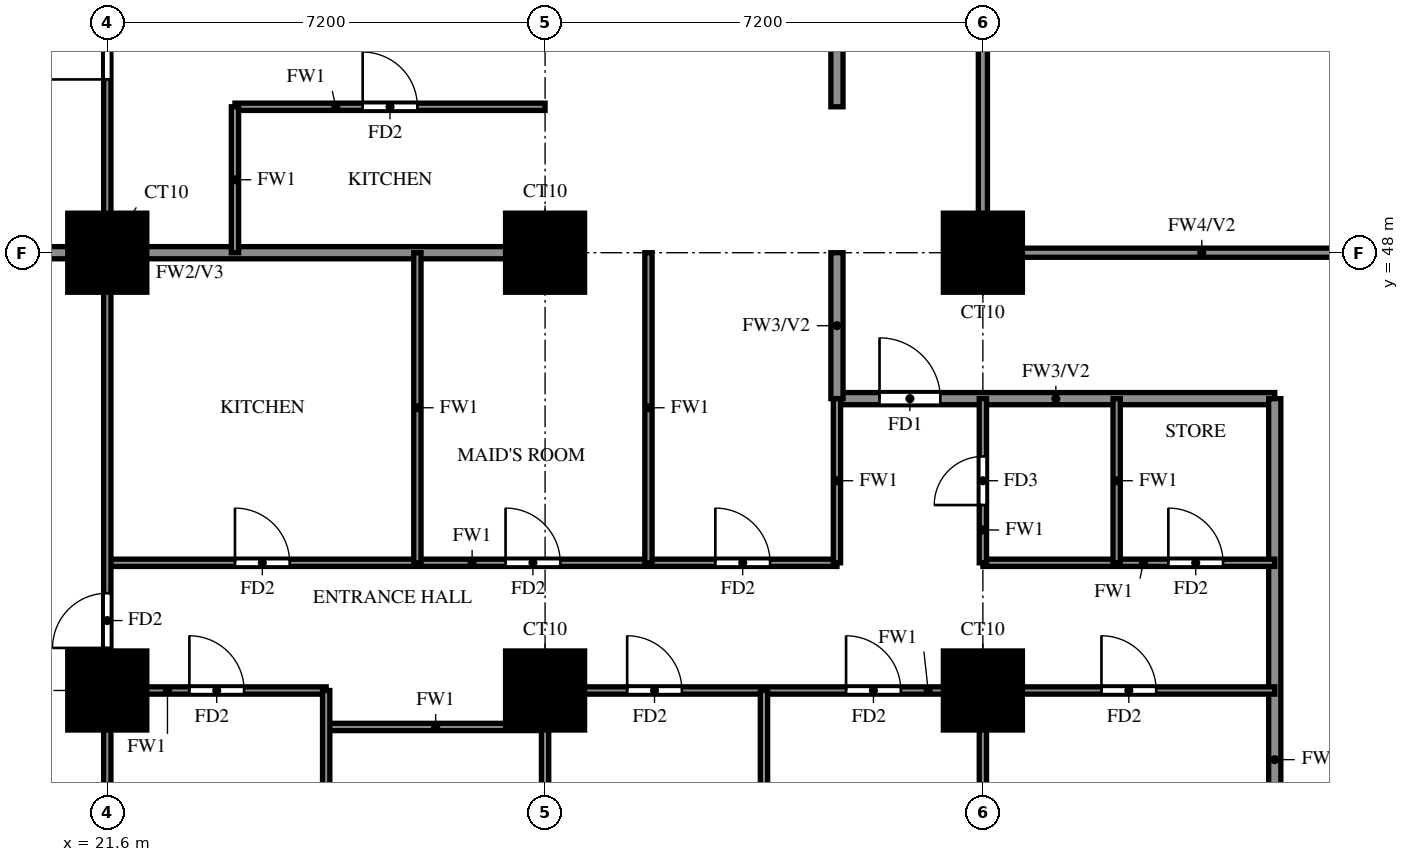
"""IFC4 building model, lengths in metres.
Left out: names, types, materials, properties, quantities, classifications, styles, units other than length and angle.
Written with IfcOpenShell. Run it as: python <this file> out.ifc"""

import sys

from ifc_helpers import new_model, si_unit, direction, frame, frame_2d, origin, origin_2d, place, context, subcontext, project, spatial, rectangle, extrude, source, transform, mapped, element, fill, save


model = new_model("IFC4")
c1 = context("Model", 3, precision=1e-05, world=origin(), true_north=direction((0.0, 1.0)))
c2 = subcontext(c1, "Body", "Model", "MODEL_VIEW")
j1 = project(units=[si_unit("LENGTHUNIT", "METRE"), si_unit("PLANEANGLEUNIT", "RADIAN")], contexts=[c1])
p1 = place(None, origin())
s1 = spatial("IfcSite", under=j1, at=p1, CompositionType="ELEMENT")
p2 = place(p1, origin())
s2 = spatial("IfcBuilding", under=s1, at=p2, CompositionType="ELEMENT")
p3 = place(p2, frame((0.0, 0.0, 72.5)))
s3 = spatial("IfcBuildingStorey", under=s2, at=p3, CompositionType="ELEMENT", Elevation=72.5)
m1 = source(origin(), c2, "Body", "SweptSolid", [
    extrude(rectangle(XDim=1.3, YDim=1.3, at=origin_2d()), origin(), (0.0, 0.0, 1.0), 3.18),
])
for number, where, z_axis, x_axis in (
    (1, (21.6, 40.8, 0.0), (0.0, 0.0, 1.0), (1.0, 0.0, 0.0)),
    (2, (28.8, 40.8, 0.0), (0.0, 0.0, 1.0), (1.0, 0.0, 0.0)),
    (3, (36.0, 40.8, 0.0), (0.0, 0.0, 1.0), (1.0, 0.0, 0.0)),
    (4, (21.6, 48.0, 0.0), (0.0, 0.0, 1.0), (1.0, 0.0, 0.0)),
    (5, (28.8, 48.0, 0.0), (0.0, 0.0, 1.0), (1.0, 0.0, 0.0)),
    (6, (36.0, 48.0, 0.0), (0.0, 0.0, 1.0), (1.0, 0.0, 0.0)),
):
    element("IfcColumn", number, at=place(p3, frame(where, z_axis=z_axis, x_axis=x_axis)), inside=s3, PredefinedType="COLUMN", context=c2, shape_type="MappedRepresentation", body=[
        mapped(m1, transform((0.0, 0.0, 0.0))),
    ])
p4 = place(p3, frame((33.6, 45.6, 0.0), z_axis=(0.0, 0.0, 1.0), x_axis=(1.0, 0.0, 0.0)))
e7 = element("IfcWall", 7, at=p4, inside=s3, PredefinedType="SOLIDWALL", context=c2, shape_type="SweptSolid", body=[
    extrude(rectangle(XDim=7.2, YDim=0.2, at=frame_2d((3.6, 0.0))), origin(), (0.0, 0.0, 1.0), 3.18),
])
p5 = place(p4, frame((0.7, 0.0, 0.0)))
e8 = element("IfcOpeningElement", 8, at=p5, cuts=e7, PredefinedType="OPENING", context=c2, shape_type="SweptSolid", body=[
    extrude(rectangle(XDim=1.0, YDim=2.1, at=frame_2d((0.5, 1.05))), frame((0.0, 0.11, 0.0), z_axis=(0.0, -1.0, 0.0), x_axis=(1.0, 0.0, 0.0)), (0.0, 0.0, 1.0), 0.22),
])
p6 = place(p3, frame((33.6, 45.6, 0.0), z_axis=(0.0, 0.0, 1.0), x_axis=(0.0, 1.0, 0.0)))
e9 = element("IfcWall", 9, at=p6, inside=s3, PredefinedType="SOLIDWALL", context=c2, shape_type="SweptSolid", body=[
    extrude(rectangle(XDim=2.4, YDim=0.2, at=frame_2d((1.2, 0.0))), origin(), (0.0, 0.0, 1.0), 3.18),
])
p7 = place(p3, frame((33.6, 50.4, 0.0), z_axis=(0.0, 0.0, 1.0), x_axis=(0.0, 1.0, 0.0)))
e10 = element("IfcWall", 10, at=p7, inside=s3, PredefinedType="SOLIDWALL", context=c2, shape_type="SweptSolid", body=[
    extrude(rectangle(XDim=9.6, YDim=0.2, at=frame_2d((4.8, 0.0))), origin(), (0.0, 0.0, 1.0), 3.18),
])
p8 = place(p3, frame((40.8, 33.725, 0.0), z_axis=(0.0, 0.0, 1.0), x_axis=(0.0, 1.0, 0.0)))
e11 = element("IfcWall", 11, at=p8, inside=s3, PredefinedType="SOLIDWALL", context=c2, shape_type="SweptSolid", body=[
    extrude(rectangle(XDim=11.875, YDim=0.2, at=frame_2d((5.938, 0.0))), origin(), (0.0, 0.0, 1.0), 2.28),
])
p9 = place(p3, frame((14.525, 48.0, 0.0), z_axis=(0.0, 0.0, 1.0), x_axis=(1.0, 0.0, 0.0)))
e12 = element("IfcWall", 12, at=p9, inside=s3, PredefinedType="SOLIDWALL", context=c2, shape_type="SweptSolid", body=[
    extrude(rectangle(XDim=14.275, YDim=0.2, at=frame_2d((7.138, 0.0))), origin(), (0.0, 0.0, 1.0), 3.18),
])
p10 = place(p3, frame((25.2, 40.2, 0.0), z_axis=(0.0, 0.0, 1.0), x_axis=(1.0, 0.0, 0.0)))
e13 = element("IfcWall", 13, at=p10, inside=s3, PredefinedType="PARTITIONING", context=c2, shape_type="SweptSolid", body=[
    extrude(rectangle(XDim=3.6, YDim=0.12, at=frame_2d((1.8, 0.0))), origin(), (0.0, 0.0, 1.0), 3.18),
])
p11 = place(p3, frame((21.6, 40.8, 0.0), z_axis=(0.0, 0.0, 1.0), x_axis=(1.0, 0.0, 0.0)))
e14 = element("IfcWall", 14, at=p11, inside=s3, PredefinedType="PARTITIONING", context=c2, shape_type="SweptSolid", body=[
    extrude(rectangle(XDim=3.6, YDim=0.12, at=frame_2d((1.8, 0.0))), origin(), (0.0, 0.0, 1.0), 3.18),
])
p12 = place(p11, frame((1.35, 0.0, 0.0)))
e15 = element("IfcOpeningElement", 15, at=p12, cuts=e14, PredefinedType="OPENING", context=c2, shape_type="SweptSolid", body=[
    extrude(rectangle(XDim=0.9, YDim=2.1, at=frame_2d((0.45, 1.05))), frame((0.0, 0.07, 0.0), z_axis=(0.0, -1.0, 0.0), x_axis=(1.0, 0.0, 0.0)), (0.0, 0.0, 1.0), 0.14),
])
p13 = place(p3, frame((28.8, 40.8, 0.0), z_axis=(0.0, 0.0, 1.0), x_axis=(1.0, 0.0, 0.0)))
e16 = element("IfcWall", 16, at=p13, inside=s3, PredefinedType="PARTITIONING", context=c2, shape_type="SweptSolid", body=[
    extrude(rectangle(XDim=12.0, YDim=0.12, at=frame_2d((6.0, 0.0))), origin(), (0.0, 0.0, 1.0), 3.18),
])
p14 = place(p13, frame((1.35, 0.0, 0.0)))
e17 = element("IfcOpeningElement", 17, at=p14, cuts=e16, PredefinedType="OPENING", context=c2, shape_type="SweptSolid", body=[
    extrude(rectangle(XDim=0.9, YDim=2.1, at=frame_2d((0.45, 1.05))), frame((0.0, 0.07, 0.0), z_axis=(0.0, -1.0, 0.0), x_axis=(1.0, 0.0, 0.0)), (0.0, 0.0, 1.0), 0.14),
])
p15 = place(p13, frame((4.95, 0.0, 0.0)))
e18 = element("IfcOpeningElement", 18, at=p15, cuts=e16, PredefinedType="OPENING", context=c2, shape_type="SweptSolid", body=[
    extrude(rectangle(XDim=0.9, YDim=2.1, at=frame_2d((0.45, 1.05))), frame((0.0, 0.07, 0.0), z_axis=(0.0, -1.0, 0.0), x_axis=(1.0, 0.0, 0.0)), (0.0, 0.0, 1.0), 0.14),
])
p16 = place(p13, frame((9.15, 0.0, 0.0)))
e19 = element("IfcOpeningElement", 19, at=p16, cuts=e16, PredefinedType="OPENING", context=c2, shape_type="SweptSolid", body=[
    extrude(rectangle(XDim=0.9, YDim=2.1, at=frame_2d((0.45, 1.05))), frame((0.0, 0.07, 0.0), z_axis=(0.0, -1.0, 0.0), x_axis=(1.0, 0.0, 0.0)), (0.0, 0.0, 1.0), 0.14),
])
p17 = place(p3, frame((21.6, 42.9, 0.0), z_axis=(0.0, 0.0, 1.0), x_axis=(1.0, 0.0, 0.0)))
e20 = element("IfcWall", 20, at=p17, inside=s3, PredefinedType="PARTITIONING", context=c2, shape_type="SweptSolid", body=[
    extrude(rectangle(XDim=12.0, YDim=0.12, at=frame_2d((6.0, 0.0))), origin(), (0.0, 0.0, 1.0), 3.18),
])
p18 = place(p17, frame((2.1, 0.0, 0.0)))
e21 = element("IfcOpeningElement", 21, at=p18, cuts=e20, PredefinedType="OPENING", context=c2, shape_type="SweptSolid", body=[
    extrude(rectangle(XDim=0.9, YDim=2.1, at=frame_2d((0.45, 1.05))), frame((0.0, 0.07, 0.0), z_axis=(0.0, -1.0, 0.0), x_axis=(1.0, 0.0, 0.0)), (0.0, 0.0, 1.0), 0.14),
])
p19 = place(p17, frame((6.55, 0.0, 0.0)))
e22 = element("IfcOpeningElement", 22, at=p19, cuts=e20, PredefinedType="OPENING", context=c2, shape_type="SweptSolid", body=[
    extrude(rectangle(XDim=0.9, YDim=2.1, at=frame_2d((0.45, 1.05))), frame((0.0, 0.07, 0.0), z_axis=(0.0, -1.0, 0.0), x_axis=(1.0, 0.0, 0.0)), (0.0, 0.0, 1.0), 0.14),
])
p20 = place(p17, frame((10.0, 0.0, 0.0)))
e23 = element("IfcOpeningElement", 23, at=p20, cuts=e20, PredefinedType="OPENING", context=c2, shape_type="SweptSolid", body=[
    extrude(rectangle(XDim=0.9, YDim=2.1, at=frame_2d((0.45, 1.05))), frame((0.0, 0.07, 0.0), z_axis=(0.0, -1.0, 0.0), x_axis=(1.0, 0.0, 0.0)), (0.0, 0.0, 1.0), 0.14),
])
p21 = place(p3, frame((36.0, 42.9, 0.0), z_axis=(0.0, 0.0, 1.0), x_axis=(1.0, 0.0, 0.0)))
e24 = element("IfcWall", 24, at=p21, inside=s3, PredefinedType="PARTITIONING", context=c2, shape_type="SweptSolid", body=[
    extrude(rectangle(XDim=4.8, YDim=0.12, at=frame_2d((2.4, 0.0))), origin(), (0.0, 0.0, 1.0), 3.18),
])
p22 = place(p21, frame((3.05, 0.0, 0.0)))
e25 = element("IfcOpeningElement", 25, at=p22, cuts=e24, PredefinedType="OPENING", context=c2, shape_type="SweptSolid", body=[
    extrude(rectangle(XDim=0.9, YDim=2.1, at=frame_2d((0.45, 1.05))), frame((0.0, 0.07, 0.0), z_axis=(0.0, -1.0, 0.0), x_axis=(1.0, 0.0, 0.0)), (0.0, 0.0, 1.0), 0.14),
])
p23 = place(p3, frame((23.7, 50.4, 0.0), z_axis=(0.0, 0.0, 1.0), x_axis=(1.0, 0.0, 0.0)))
e26 = element("IfcWall", 26, at=p23, inside=s3, PredefinedType="PARTITIONING", context=c2, shape_type="SweptSolid", body=[
    extrude(rectangle(XDim=5.1, YDim=0.12, at=frame_2d((2.55, 0.0))), origin(), (0.0, 0.0, 1.0), 3.18),
])
p24 = place(p23, frame((2.1, 0.0, 0.0)))
e27 = element("IfcOpeningElement", 27, at=p24, cuts=e26, PredefinedType="OPENING", context=c2, shape_type="SweptSolid", body=[
    extrude(rectangle(XDim=0.9, YDim=2.1, at=frame_2d((0.45, 1.05))), frame((0.0, 0.07, 0.0), z_axis=(0.0, -1.0, 0.0), x_axis=(1.0, 0.0, 0.0)), (0.0, 0.0, 1.0), 0.14),
])
p25 = place(p3, frame((21.6, 33.725, 0.0), z_axis=(0.0, 0.0, 1.0), x_axis=(0.0, 1.0, 0.0)))
e28 = element("IfcWall", 28, at=p25, inside=s3, PredefinedType="PARTITIONING", context=c2, shape_type="SweptSolid", body=[
    extrude(rectangle(XDim=39.475, YDim=0.12, at=frame_2d((19.737, 0.0))), origin(), (0.0, 0.0, 1.0), 3.18),
])
p26 = place(p25, frame((7.775, 0.0, 0.0)))
e29 = element("IfcOpeningElement", 29, at=p26, cuts=e28, PredefinedType="OPENING", context=c2, shape_type="SweptSolid", body=[
    extrude(rectangle(XDim=0.9, YDim=2.1, at=frame_2d((0.45, 1.05))), frame((0.0, 0.07, 0.0), z_axis=(0.0, -1.0, 0.0), x_axis=(1.0, 0.0, 0.0)), (0.0, 0.0, 1.0), 0.14),
])
p27 = place(p25, frame((17.125, 0.0, 0.0)))
e30 = element("IfcOpeningElement", 30, at=p27, cuts=e28, PredefinedType="OPENING", context=c2, shape_type="SweptSolid", body=[
    extrude(rectangle(XDim=1.5, YDim=2.1, at=frame_2d((0.75, 1.05))), frame((0.0, 0.07, 0.0), z_axis=(0.0, -1.0, 0.0), x_axis=(1.0, 0.0, 0.0)), (0.0, 0.0, 1.0), 0.14),
])
p28 = place(p25, frame((22.825, 0.0, 0.0)))
e31 = element("IfcOpeningElement", 31, at=p28, cuts=e28, PredefinedType="OPENING", context=c2, shape_type="SweptSolid", body=[
    extrude(rectangle(XDim=0.9, YDim=2.1, at=frame_2d((0.45, 1.05))), frame((0.0, 0.07, 0.0), z_axis=(0.0, -1.0, 0.0), x_axis=(1.0, 0.0, 0.0)), (0.0, 0.0, 1.0), 0.14),
])
p29 = place(p25, frame((26.425, 0.0, 0.0)))
e32 = element("IfcOpeningElement", 32, at=p29, cuts=e28, PredefinedType="OPENING", context=c2, shape_type="SweptSolid", body=[
    extrude(rectangle(XDim=0.9, YDim=2.1, at=frame_2d((0.45, 1.05))), frame((0.0, 0.07, 0.0), z_axis=(0.0, -1.0, 0.0), x_axis=(1.0, 0.0, 0.0)), (0.0, 0.0, 1.0), 0.14),
])
p30 = place(p25, frame((30.025, 0.0, 0.0)))
e33 = element("IfcOpeningElement", 33, at=p30, cuts=e28, PredefinedType="OPENING", context=c2, shape_type="SweptSolid", body=[
    extrude(rectangle(XDim=0.9, YDim=2.1, at=frame_2d((0.45, 1.05))), frame((0.0, 0.07, 0.0), z_axis=(0.0, -1.0, 0.0), x_axis=(1.0, 0.0, 0.0)), (0.0, 0.0, 1.0), 0.14),
])
p31 = place(p25, frame((33.625, 0.0, 0.0)))
e34 = element("IfcOpeningElement", 34, at=p31, cuts=e28, PredefinedType="OPENING", context=c2, shape_type="SweptSolid", body=[
    extrude(rectangle(XDim=0.9, YDim=2.1, at=frame_2d((0.45, 1.05))), frame((0.0, 0.07, 0.0), z_axis=(0.0, -1.0, 0.0), x_axis=(1.0, 0.0, 0.0)), (0.0, 0.0, 1.0), 0.14),
])
p32 = place(p25, frame((37.225, 0.0, 0.0)))
e35 = element("IfcOpeningElement", 35, at=p32, cuts=e28, PredefinedType="OPENING", context=c2, shape_type="SweptSolid", body=[
    extrude(rectangle(XDim=0.9, YDim=2.1, at=frame_2d((0.45, 1.05))), frame((0.0, 0.07, 0.0), z_axis=(0.0, -1.0, 0.0), x_axis=(1.0, 0.0, 0.0)), (0.0, 0.0, 1.0), 0.14),
])
p33 = place(p3, frame((23.7, 48.0, 0.0), z_axis=(0.0, 0.0, 1.0), x_axis=(0.0, 1.0, 0.0)))
e36 = element("IfcWall", 36, at=p33, inside=s3, PredefinedType="PARTITIONING", context=c2, shape_type="SweptSolid", body=[
    extrude(rectangle(XDim=2.4, YDim=0.12, at=frame_2d((1.2, 0.0))), origin(), (0.0, 0.0, 1.0), 3.18),
])
p34 = place(p3, frame((25.2, 33.725, 0.0), z_axis=(0.0, 0.0, 1.0), x_axis=(0.0, 1.0, 0.0)))
e37 = element("IfcWall", 37, at=p34, inside=s3, PredefinedType="PARTITIONING", context=c2, shape_type="SweptSolid", body=[
    extrude(rectangle(XDim=7.075, YDim=0.12, at=frame_2d((3.538, 0.0))), origin(), (0.0, 0.0, 1.0), 2.28),
])
p35 = place(p34, frame((2.837, 0.0, 0.0)))
e38 = element("IfcOpeningElement", 38, at=p35, cuts=e37, PredefinedType="OPENING", context=c2, shape_type="SweptSolid", body=[
    extrude(rectangle(XDim=0.8, YDim=2.1, at=frame_2d((0.4, 1.05))), frame((0.0, 0.07, 0.0), z_axis=(0.0, -1.0, 0.0), x_axis=(1.0, 0.0, 0.0)), (0.0, 0.0, 1.0), 0.14),
])
p36 = place(p3, frame((26.7, 42.9, 0.0), z_axis=(0.0, 0.0, 1.0), x_axis=(0.0, 1.0, 0.0)))
e39 = element("IfcWall", 39, at=p36, inside=s3, PredefinedType="PARTITIONING", context=c2, shape_type="SweptSolid", body=[
    extrude(rectangle(XDim=5.1, YDim=0.12, at=frame_2d((2.55, 0.0))), origin(), (0.0, 0.0, 1.0), 3.18),
])
p37 = place(p3, frame((28.8, 33.725, 0.0), z_axis=(0.0, 0.0, 1.0), x_axis=(0.0, 1.0, 0.0)))
e40 = element("IfcWall", 40, at=p37, inside=s3, PredefinedType="PARTITIONING", context=c2, shape_type="SweptSolid", body=[
    extrude(rectangle(XDim=7.075, YDim=0.12, at=frame_2d((3.538, 0.0))), origin(), (0.0, 0.0, 1.0), 3.18),
])
p38 = place(p3, frame((30.5, 42.9, 0.0), z_axis=(0.0, 0.0, 1.0), x_axis=(0.0, 1.0, 0.0)))
e41 = element("IfcWall", 41, at=p38, inside=s3, PredefinedType="PARTITIONING", context=c2, shape_type="SweptSolid", body=[
    extrude(rectangle(XDim=5.1, YDim=0.12, at=frame_2d((2.55, 0.0))), origin(), (0.0, 0.0, 1.0), 3.18),
])
p39 = place(p3, frame((32.4, 33.725, 0.0), z_axis=(0.0, 0.0, 1.0), x_axis=(0.0, 1.0, 0.0)))
e42 = element("IfcWall", 42, at=p39, inside=s3, PredefinedType="PARTITIONING", context=c2, shape_type="SweptSolid", body=[
    extrude(rectangle(XDim=7.075, YDim=0.12, at=frame_2d((3.538, 0.0))), origin(), (0.0, 0.0, 1.0), 2.28),
])
p40 = place(p3, frame((33.6, 42.9, 0.0), z_axis=(0.0, 0.0, 1.0), x_axis=(0.0, 1.0, 0.0)))
e43 = element("IfcWall", 43, at=p40, inside=s3, PredefinedType="PARTITIONING", context=c2, shape_type="SweptSolid", body=[
    extrude(rectangle(XDim=2.7, YDim=0.12, at=frame_2d((1.35, 0.0))), origin(), (0.0, 0.0, 1.0), 3.18),
])
p41 = place(p3, frame((36.0, 33.725, 0.0), z_axis=(0.0, 0.0, 1.0), x_axis=(0.0, 1.0, 0.0)))
e44 = element("IfcWall", 44, at=p41, inside=s3, PredefinedType="PARTITIONING", context=c2, shape_type="SweptSolid", body=[
    extrude(rectangle(XDim=7.075, YDim=0.12, at=frame_2d((3.538, 0.0))), origin(), (0.0, 0.0, 1.0), 3.18),
])
p42 = place(p3, frame((36.0, 42.9, 0.0), z_axis=(0.0, 0.0, 1.0), x_axis=(0.0, 1.0, 0.0)))
e45 = element("IfcWall", 45, at=p42, inside=s3, PredefinedType="PARTITIONING", context=c2, shape_type="SweptSolid", body=[
    extrude(rectangle(XDim=2.7, YDim=0.12, at=frame_2d((1.35, 0.0))), origin(), (0.0, 0.0, 1.0), 3.18),
])
p43 = place(p42, frame((0.95, 0.0, 0.0)))
e46 = element("IfcOpeningElement", 46, at=p43, cuts=e45, PredefinedType="OPENING", context=c2, shape_type="SweptSolid", body=[
    extrude(rectangle(XDim=0.8, YDim=2.1, at=frame_2d((0.4, 1.05))), frame((0.0, 0.07, 0.0), z_axis=(0.0, -1.0, 0.0), x_axis=(1.0, 0.0, 0.0)), (0.0, 0.0, 1.0), 0.14),
])
p44 = place(p3, frame((38.2, 42.9, 0.0), z_axis=(0.0, 0.0, 1.0), x_axis=(0.0, 1.0, 0.0)))
e47 = element("IfcWall", 47, at=p44, inside=s3, PredefinedType="PARTITIONING", context=c2, shape_type="SweptSolid", body=[
    extrude(rectangle(XDim=2.7, YDim=0.12, at=frame_2d((1.35, 0.0))), origin(), (0.0, 0.0, 1.0), 3.18),
])
p45 = place(p3, frame((36.0, 48.0, 0.0), z_axis=(0.0, 0.0, 1.0), x_axis=(1.0, 0.0, 0.0)))
e48 = element("IfcWall", 48, at=p45, inside=s3, PredefinedType="SOLIDWALL", context=c2, shape_type="SweptSolid", body=[
    extrude(rectangle(XDim=7.2, YDim=0.15, at=frame_2d((3.6, 0.0))), origin(), (0.0, 0.0, 1.0), 2.28),
])
p46 = place(p3, frame((36.0, 48.0, 0.0), z_axis=(0.0, 0.0, 1.0), x_axis=(0.0, 1.0, 0.0)))
e49 = element("IfcWall", 49, at=p46, inside=s3, PredefinedType="SOLIDWALL", context=c2, shape_type="SweptSolid", body=[
    extrude(rectangle(XDim=14.4, YDim=0.15, at=frame_2d((7.2, 0.0))), origin(), (0.0, 0.0, 1.0), 2.28),
])
p47 = place(p5, origin())
e50 = element("IfcDoor", 50, at=p47, inside=s3, OperationType="SINGLE_SWING_RIGHT", PredefinedType="DOOR", context=c2, shape_type="SweptSolid", body=[
    extrude(rectangle(XDim=1.0, YDim=2.1, at=frame_2d((0.5, 1.05))), frame((0.0, 0.025, 0.0), z_axis=(0.0, -1.0, 0.0), x_axis=(1.0, 0.0, 0.0)), (0.0, 0.0, 1.0), 0.05),
])
fill(e8, e50)
p48 = place(p26, origin())
e51 = element("IfcDoor", 51, at=p48, inside=s3, OperationType="SINGLE_SWING_RIGHT", PredefinedType="DOOR", context=c2, shape_type="SweptSolid", body=[
    extrude(rectangle(XDim=0.9, YDim=2.1, at=frame_2d((0.45, 1.05))), frame((0.0, 0.025, 0.0), z_axis=(0.0, -1.0, 0.0), x_axis=(1.0, 0.0, 0.0)), (0.0, 0.0, 1.0), 0.05),
])
fill(e29, e51)
p49 = place(p12, origin())
e52 = element("IfcDoor", 52, at=p49, inside=s3, OperationType="SINGLE_SWING_LEFT", PredefinedType="DOOR", context=c2, shape_type="SweptSolid", body=[
    extrude(rectangle(XDim=0.9, YDim=2.1, at=frame_2d((0.45, 1.05))), frame((0.0, 0.025, 0.0), z_axis=(0.0, -1.0, 0.0), x_axis=(1.0, 0.0, 0.0)), (0.0, 0.0, 1.0), 0.05),
])
fill(e15, e52)
p50 = place(p14, origin())
e53 = element("IfcDoor", 53, at=p50, inside=s3, OperationType="SINGLE_SWING_LEFT", PredefinedType="DOOR", context=c2, shape_type="SweptSolid", body=[
    extrude(rectangle(XDim=0.9, YDim=2.1, at=frame_2d((0.45, 1.05))), frame((0.0, 0.025, 0.0), z_axis=(0.0, -1.0, 0.0), x_axis=(1.0, 0.0, 0.0)), (0.0, 0.0, 1.0), 0.05),
])
fill(e17, e53)
p51 = place(p15, origin())
e54 = element("IfcDoor", 54, at=p51, inside=s3, OperationType="SINGLE_SWING_LEFT", PredefinedType="DOOR", context=c2, shape_type="SweptSolid", body=[
    extrude(rectangle(XDim=0.9, YDim=2.1, at=frame_2d((0.45, 1.05))), frame((0.0, 0.025, 0.0), z_axis=(0.0, -1.0, 0.0), x_axis=(1.0, 0.0, 0.0)), (0.0, 0.0, 1.0), 0.05),
])
fill(e18, e54)
p52 = place(p16, origin())
e55 = element("IfcDoor", 55, at=p52, inside=s3, OperationType="SINGLE_SWING_RIGHT", PredefinedType="DOOR", context=c2, shape_type="SweptSolid", body=[
    extrude(rectangle(XDim=0.9, YDim=2.1, at=frame_2d((0.45, 1.05))), frame((0.0, 0.025, 0.0), z_axis=(0.0, -1.0, 0.0), x_axis=(1.0, 0.0, 0.0)), (0.0, 0.0, 1.0), 0.05),
])
fill(e19, e55)
p53 = place(p18, origin())
e56 = element("IfcDoor", 56, at=p53, inside=s3, OperationType="SINGLE_SWING_LEFT", PredefinedType="DOOR", context=c2, shape_type="SweptSolid", body=[
    extrude(rectangle(XDim=0.9, YDim=2.1, at=frame_2d((0.45, 1.05))), frame((0.0, 0.025, 0.0), z_axis=(0.0, -1.0, 0.0), x_axis=(1.0, 0.0, 0.0)), (0.0, 0.0, 1.0), 0.05),
])
fill(e21, e56)
p54 = place(p19, origin())
e57 = element("IfcDoor", 57, at=p54, inside=s3, OperationType="SINGLE_SWING_LEFT", PredefinedType="DOOR", context=c2, shape_type="SweptSolid", body=[
    extrude(rectangle(XDim=0.9, YDim=2.1, at=frame_2d((0.45, 1.05))), frame((0.0, 0.025, 0.0), z_axis=(0.0, -1.0, 0.0), x_axis=(1.0, 0.0, 0.0)), (0.0, 0.0, 1.0), 0.05),
])
fill(e22, e57)
p55 = place(p20, origin())
e58 = element("IfcDoor", 58, at=p55, inside=s3, OperationType="SINGLE_SWING_RIGHT", PredefinedType="DOOR", context=c2, shape_type="SweptSolid", body=[
    extrude(rectangle(XDim=0.9, YDim=2.1, at=frame_2d((0.45, 1.05))), frame((0.0, 0.025, 0.0), z_axis=(0.0, -1.0, 0.0), x_axis=(1.0, 0.0, 0.0)), (0.0, 0.0, 1.0), 0.05),
])
fill(e23, e58)
p56 = place(p43, origin())
e59 = element("IfcDoor", 59, at=p56, inside=s3, OperationType="SINGLE_SWING_LEFT", PredefinedType="DOOR", context=c2, shape_type="SweptSolid", body=[
    extrude(rectangle(XDim=0.8, YDim=2.1, at=frame_2d((0.4, 1.05))), frame((0.0, 0.025, 0.0), z_axis=(0.0, -1.0, 0.0), x_axis=(1.0, 0.0, 0.0)), (0.0, 0.0, 1.0), 0.05),
])
fill(e46, e59)
p57 = place(p22, origin())
e60 = element("IfcDoor", 60, at=p57, inside=s3, OperationType="SINGLE_SWING_LEFT", PredefinedType="DOOR", context=c2, shape_type="SweptSolid", body=[
    extrude(rectangle(XDim=0.9, YDim=2.1, at=frame_2d((0.45, 1.05))), frame((0.0, 0.025, 0.0), z_axis=(0.0, -1.0, 0.0), x_axis=(1.0, 0.0, 0.0)), (0.0, 0.0, 1.0), 0.05),
])
fill(e25, e60)
p58 = place(p27, origin())
e61 = element("IfcDoor", 61, at=p58, inside=s3, OperationType="SINGLE_SWING_LEFT", PredefinedType="DOOR", context=c2, shape_type="SweptSolid", body=[
    extrude(rectangle(XDim=1.5, YDim=2.1, at=frame_2d((0.75, 1.05))), frame((0.0, 0.025, 0.0), z_axis=(0.0, -1.0, 0.0), x_axis=(1.0, 0.0, 0.0)), (0.0, 0.0, 1.0), 0.05),
])
fill(e30, e61)
p59 = place(p24, origin())
e62 = element("IfcDoor", 62, at=p59, inside=s3, OperationType="SINGLE_SWING_LEFT", PredefinedType="DOOR", context=c2, shape_type="SweptSolid", body=[
    extrude(rectangle(XDim=0.9, YDim=2.1, at=frame_2d((0.45, 1.05))), frame((0.0, 0.025, 0.0), z_axis=(0.0, -1.0, 0.0), x_axis=(1.0, 0.0, 0.0)), (0.0, 0.0, 1.0), 0.05),
])
fill(e27, e62)
save(model, sys.argv[1])
